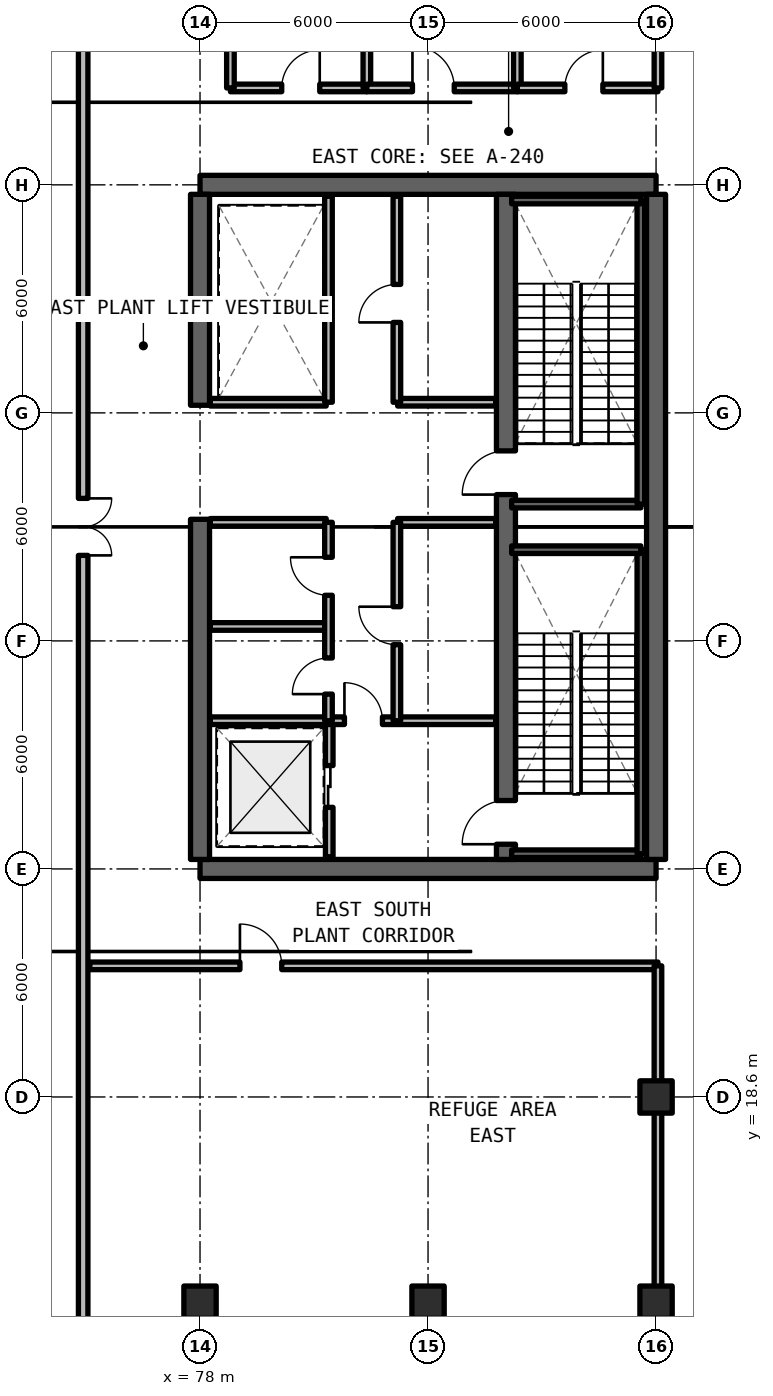
"""IFC4 building model, lengths in metres.
Left out: names, types, materials, properties, quantities, classifications, styles, units other than length and angle.
Written with IfcOpenShell. Run it as: python <this file> out.ifc"""

import sys

from ifc_helpers import new_model, si_unit, direction, frame, frame_2d, origin, origin_2d, place, context, subcontext, project, spatial, rectangle, extrude, element, fill, save


model = new_model("IFC4")
c1 = context("Model", 3, precision=1e-05, world=origin(), true_north=direction((0.0, 1.0)))
c2 = subcontext(c1, "Body", "Model", "MODEL_VIEW")
j1 = project(units=[si_unit("LENGTHUNIT", "METRE"), si_unit("PLANEANGLEUNIT", "RADIAN")], contexts=[c1])
p1 = place(None, origin())
s1 = spatial("IfcSite", under=j1, at=p1, CompositionType="ELEMENT")
p2 = place(p1, origin())
s2 = spatial("IfcBuilding", under=s1, at=p2, CompositionType="ELEMENT")
p3 = place(p2, frame((0.0, 0.0, 172.92)))
s3 = spatial("IfcBuildingStorey", under=s2, at=p3, CompositionType="ELEMENT", Elevation=172.92)
for number, where, z_axis, x_axis in (
    (1, (78.0, 24.6, 0.0), (0.0, 0.0, 1.0), (1.0, 0.0, 0.0)),
    (2, (90.0, 42.6, 0.0), (0.0, 0.0, 1.0), (-1.0, 0.0, 0.0)),
):
    element("IfcWall", number, at=place(p3, frame(where, z_axis=z_axis, x_axis=x_axis)), inside=s3, PredefinedType="SHEAR", context=c2, shape_type="SweptSolid", body=[
        extrude(rectangle(XDim=12.0, YDim=0.5, at=frame_2d((6.0, 0.0))), origin(), (0.0, 0.0, 1.0), 4.95),
    ])
p4 = place(p3, frame((90.0, 24.85, 0.0), z_axis=(0.0, 0.0, 1.0), x_axis=(0.0, 1.0, 0.0)))
e3 = element("IfcWall", 3, at=p4, inside=s3, PredefinedType="SHEAR", context=c2, shape_type="SweptSolid", body=[
    extrude(rectangle(XDim=17.5, YDim=0.5, at=frame_2d((8.75, 0.0))), origin(), (0.0, 0.0, 1.0), 4.95),
])
p5 = place(p3, frame((78.0, 24.85, 0.0), z_axis=(0.0, 0.0, 1.0), x_axis=(0.0, 1.0, 0.0)))
e4 = element("IfcWall", 4, at=p5, inside=s3, PredefinedType="SHEAR", context=c2, shape_type="SweptSolid", body=[
    extrude(rectangle(XDim=8.95, YDim=0.5, at=frame_2d((4.475, 0.0))), origin(), (0.0, 0.0, 1.0), 4.95),
])
p6 = place(p3, frame((78.0, 36.8, 0.0), z_axis=(0.0, 0.0, 1.0), x_axis=(0.0, 1.0, 0.0)))
e5 = element("IfcWall", 5, at=p6, inside=s3, PredefinedType="SHEAR", context=c2, shape_type="SweptSolid", body=[
    extrude(rectangle(XDim=5.55, YDim=0.5, at=frame_2d((2.775, 0.0))), origin(), (0.0, 0.0, 1.0), 4.95),
])
p7 = place(p3, frame((86.05, 24.85, 0.0), z_axis=(0.0, 0.0, 1.0), x_axis=(0.0, 1.0, 0.0)))
e6 = element("IfcWall", 6, at=p7, inside=s3, PredefinedType="SHEAR", context=c2, shape_type="SweptSolid", body=[
    extrude(rectangle(XDim=17.5, YDim=0.5, at=frame_2d((8.75, 0.0))), origin(), (0.0, 0.0, 1.0), 4.95),
])
p8 = place(p7, frame((0.4, 0.0, 0.0)))
e7 = element("IfcOpeningElement", 7, at=p8, cuts=e6, PredefinedType="OPENING", context=c2, shape_type="SweptSolid", body=[
    extrude(rectangle(XDim=1.15, YDim=2.15, at=frame_2d((0.575, 1.075))), frame((0.0, 0.26, 0.0), z_axis=(0.0, -1.0, 0.0), x_axis=(1.0, 0.0, 0.0)), (0.0, 0.0, 1.0), 0.52),
])
p9 = place(p7, frame((9.6, 0.0, 0.0)))
e8 = element("IfcOpeningElement", 8, at=p9, cuts=e6, PredefinedType="OPENING", context=c2, shape_type="SweptSolid", body=[
    extrude(rectangle(XDim=1.15, YDim=2.15, at=frame_2d((0.575, 1.075))), frame((0.0, 0.26, 0.0), z_axis=(0.0, -1.0, 0.0), x_axis=(1.0, 0.0, 0.0)), (0.0, 0.0, 1.0), 0.52),
])
p10 = place(p3, frame((90.0, 18.6, 0.0), z_axis=(0.0, 0.0, 1.0), x_axis=(1.0, 0.0, 0.0)))
e9 = element("IfcColumn", 9, at=p10, inside=s3, PredefinedType="COLUMN", context=c2, shape_type="SweptSolid", body=[
    extrude(rectangle(XDim=0.85, YDim=0.85, at=origin_2d()), origin(), (0.0, 0.0, 1.0), 4.95),
])
for number, where, z_axis, x_axis in (
    (10, (78.0, 13.2, 0.0), (0.0, 0.0, 1.0), (1.0, 0.0, 0.0)),
    (11, (84.0, 13.2, 0.0), (0.0, 0.0, 1.0), (1.0, 0.0, 0.0)),
    (12, (90.0, 13.2, 0.0), (0.0, 0.0, 1.0), (1.0, 0.0, 0.0)),
):
    element("IfcColumn", number, at=place(p3, frame(where, z_axis=z_axis, x_axis=x_axis)), inside=s3, PredefinedType="COLUMN", context=c2, shape_type="SweptSolid", body=[
        extrude(rectangle(XDim=0.85, YDim=0.85, at=origin_2d()), origin(), (0.0, 0.0, 1.0), 4.67),
    ])
p11 = place(p3, frame((74.925, 55.175, 0.0), z_axis=(0.0, 0.0, 1.0), x_axis=(0.0, -1.0, 0.0)))
e13 = element("IfcWall", 13, at=p11, inside=s3, PredefinedType="SOLIDWALL", context=c2, shape_type="SweptSolid", body=[
    extrude(rectangle(XDim=43.15, YDim=0.25, at=frame_2d((21.575, 0.0))), origin(), (0.0, 0.0, 1.0), 4.67),
])
p12 = place(p11, frame((20.825, 0.0, 0.0)))
e14 = element("IfcOpeningElement", 14, at=p12, cuts=e13, PredefinedType="OPENING", context=c2, shape_type="SweptSolid", body=[
    extrude(rectangle(XDim=1.5, YDim=2.2, at=frame_2d((0.75, 1.1))), frame((0.0, 0.135, 0.0), z_axis=(0.0, -1.0, 0.0), x_axis=(1.0, 0.0, 0.0)), (0.0, 0.0, 1.0), 0.27),
])
p13 = place(p3, frame((81.4, 24.92, 0.0), z_axis=(0.0, 0.0, 1.0), x_axis=(0.0, 1.0, 0.0)))
e15 = element("IfcWall", 15, at=p13, inside=s3, PredefinedType="SOLIDWALL", context=c2, shape_type="SweptSolid", body=[
    extrude(rectangle(XDim=3.58, YDim=0.2, at=frame_2d((1.79, 0.0))), origin(), (0.0, 0.0, 1.0), 3.89),
])
p14 = place(p13, frame((1.3, 0.0, 0.0)))
e16 = element("IfcOpeningElement", 16, at=p14, cuts=e15, PredefinedType="OPENING", context=c2, shape_type="SweptSolid", body=[
    extrude(rectangle(XDim=1.1, YDim=2.2, at=frame_2d((0.55, 1.1))), frame((0.0, 0.11, 0.0), z_axis=(0.0, -1.0, 0.0), x_axis=(1.0, 0.0, 0.0)), (0.0, 0.0, 1.0), 0.22),
])
p15 = place(p3, frame((78.27, 28.5, 0.0), z_axis=(0.0, 0.0, 1.0), x_axis=(1.0, 0.0, 0.0)))
e17 = element("IfcWall", 17, at=p15, inside=s3, PredefinedType="SOLIDWALL", context=c2, shape_type="SweptSolid", body=[
    extrude(rectangle(XDim=7.51, YDim=0.2, at=frame_2d((3.755, 0.0))), origin(), (0.0, 0.0, 1.0), 3.89),
])
p16 = place(p15, frame((3.53, 0.0, 0.0)))
e18 = element("IfcOpeningElement", 18, at=p16, cuts=e17, PredefinedType="OPENING", context=c2, shape_type="SweptSolid", body=[
    extrude(rectangle(XDim=1.0, YDim=2.15, at=frame_2d((0.5, 1.075))), frame((0.0, 0.11, 0.0), z_axis=(0.0, -1.0, 0.0), x_axis=(1.0, 0.0, 0.0)), (0.0, 0.0, 1.0), 0.22),
])
p17 = place(p3, frame((83.2, 33.72, 0.0), z_axis=(0.0, 0.0, 1.0), x_axis=(1.0, 0.0, 0.0)))
e19 = element("IfcWall", 19, at=p17, inside=s3, PredefinedType="SOLIDWALL", context=c2, shape_type="SweptSolid", body=[
    extrude(rectangle(XDim=2.58, YDim=0.2, at=frame_2d((1.29, 0.0))), origin(), (0.0, 0.0, 1.0), 3.89),
])
p18 = place(p3, frame((83.18, 28.5, 0.0), z_axis=(0.0, 0.0, 1.0), x_axis=(0.0, 1.0, 0.0)))
e20 = element("IfcWall", 20, at=p18, inside=s3, PredefinedType="SOLIDWALL", context=c2, shape_type="SweptSolid", body=[
    extrude(rectangle(XDim=5.22, YDim=0.2, at=frame_2d((2.61, 0.0))), origin(), (0.0, 0.0, 1.0), 3.89),
])
p19 = place(p18, frame((2.0, 0.0, 0.0)))
e21 = element("IfcOpeningElement", 21, at=p19, cuts=e20, PredefinedType="OPENING", context=c2, shape_type="SweptSolid", body=[
    extrude(rectangle(XDim=1.0, YDim=2.15, at=frame_2d((0.5, 1.075))), frame((0.0, 0.11, 0.0), z_axis=(0.0, -1.0, 0.0), x_axis=(1.0, 0.0, 0.0)), (0.0, 0.0, 1.0), 0.22),
])
for number, where, z_axis, x_axis in (
    (22, (78.27, 30.98, 0.0), (0.0, 0.0, 1.0), (1.0, 0.0, 0.0)),
    (23, (78.27, 33.72, 0.0), (0.0, 0.0, 1.0), (1.0, 0.0, 0.0)),
):
    element("IfcWall", number, at=place(p3, frame(where, z_axis=z_axis, x_axis=x_axis)), inside=s3, PredefinedType="SOLIDWALL", context=c2, shape_type="SweptSolid", body=[
        extrude(rectangle(XDim=3.05, YDim=0.2, at=frame_2d((1.525, 0.0))), origin(), (0.0, 0.0, 1.0), 3.89),
    ])
p20 = place(p3, frame((81.38, 28.5, 0.0), z_axis=(0.0, 0.0, 1.0), x_axis=(0.0, 1.0, 0.0)))
e24 = element("IfcWall", 24, at=p20, inside=s3, PredefinedType="SOLIDWALL", context=c2, shape_type="SweptSolid", body=[
    extrude(rectangle(XDim=5.22, YDim=0.2, at=frame_2d((2.61, 0.0))), origin(), (0.0, 0.0, 1.0), 3.89),
])
p21 = place(p20, frame((0.7, 0.0, 0.0)))
e25 = element("IfcOpeningElement", 25, at=p21, cuts=e24, PredefinedType="OPENING", context=c2, shape_type="SweptSolid", body=[
    extrude(rectangle(XDim=0.95, YDim=2.15, at=frame_2d((0.475, 1.075))), frame((0.0, 0.11, 0.0), z_axis=(0.0, -1.0, 0.0), x_axis=(1.0, 0.0, 0.0)), (0.0, 0.0, 1.0), 0.22),
])
p22 = place(p20, frame((3.3, 0.0, 0.0)))
e26 = element("IfcOpeningElement", 26, at=p22, cuts=e24, PredefinedType="OPENING", context=c2, shape_type="SweptSolid", body=[
    extrude(rectangle(XDim=1.0, YDim=2.15, at=frame_2d((0.5, 1.075))), frame((0.0, 0.11, 0.0), z_axis=(0.0, -1.0, 0.0), x_axis=(1.0, 0.0, 0.0)), (0.0, 0.0, 1.0), 0.22),
])
p23 = place(p3, frame((83.2, 36.88, 0.0), z_axis=(0.0, 0.0, 1.0), x_axis=(1.0, 0.0, 0.0)))
e27 = element("IfcWall", 27, at=p23, inside=s3, PredefinedType="SOLIDWALL", context=c2, shape_type="SweptSolid", body=[
    extrude(rectangle(XDim=2.58, YDim=0.2, at=frame_2d((1.29, 0.0))), origin(), (0.0, 0.0, 1.0), 3.89),
])
p24 = place(p3, frame((83.18, 36.88, 0.0), z_axis=(0.0, 0.0, 1.0), x_axis=(0.0, 1.0, 0.0)))
e28 = element("IfcWall", 28, at=p24, inside=s3, PredefinedType="SOLIDWALL", context=c2, shape_type="SweptSolid", body=[
    extrude(rectangle(XDim=5.42, YDim=0.2, at=frame_2d((2.71, 0.0))), origin(), (0.0, 0.0, 1.0), 3.89),
])
p25 = place(p24, frame((2.1, 0.0, 0.0)))
e29 = element("IfcOpeningElement", 29, at=p25, cuts=e28, PredefinedType="OPENING", context=c2, shape_type="SweptSolid", body=[
    extrude(rectangle(XDim=1.0, YDim=2.15, at=frame_2d((0.5, 1.075))), frame((0.0, 0.11, 0.0), z_axis=(0.0, -1.0, 0.0), x_axis=(1.0, 0.0, 0.0)), (0.0, 0.0, 1.0), 0.22),
])
p26 = place(p3, frame((78.27, 36.88, 0.0), z_axis=(0.0, 0.0, 1.0), x_axis=(1.0, 0.0, 0.0)))
e30 = element("IfcWall", 30, at=p26, inside=s3, PredefinedType="SOLIDWALL", context=c2, shape_type="SweptSolid", body=[
    extrude(rectangle(XDim=3.05, YDim=0.2, at=frame_2d((1.525, 0.0))), origin(), (0.0, 0.0, 1.0), 3.89),
])
p27 = place(p3, frame((81.38, 36.88, 0.0), z_axis=(0.0, 0.0, 1.0), x_axis=(0.0, 1.0, 0.0)))
e31 = element("IfcWall", 31, at=p27, inside=s3, PredefinedType="SOLIDWALL", context=c2, shape_type="SweptSolid", body=[
    extrude(rectangle(XDim=5.42, YDim=0.2, at=frame_2d((2.71, 0.0))), origin(), (0.0, 0.0, 1.0), 3.89),
])
p28 = place(p3, frame((75.1, 22.05, 0.0), z_axis=(0.0, 0.0, 1.0), x_axis=(1.0, 0.0, 0.0)))
e32 = element("IfcWall", 32, at=p28, inside=s3, PredefinedType="SOLIDWALL", context=c2, shape_type="SweptSolid", body=[
    extrude(rectangle(XDim=14.95, YDim=0.2, at=frame_2d((7.475, 0.0))), origin(), (0.0, 0.0, 1.0), 3.89),
])
p29 = place(p28, frame((3.95, 0.0, 0.0)))
e33 = element("IfcOpeningElement", 33, at=p29, cuts=e32, PredefinedType="OPENING", context=c2, shape_type="SweptSolid", body=[
    extrude(rectangle(XDim=1.1, YDim=2.15, at=frame_2d((0.55, 1.075))), frame((0.0, 0.11, 0.0), z_axis=(0.0, -1.0, 0.0), x_axis=(1.0, 0.0, 0.0)), (0.0, 0.0, 1.0), 0.22),
])
p30 = place(p3, frame((90.05, 12.15, 0.0), z_axis=(0.0, 0.0, 1.0), x_axis=(0.0, 1.0, 0.0)))
e34 = element("IfcWall", 34, at=p30, inside=s3, PredefinedType="SOLIDWALL", context=c2, shape_type="SweptSolid", body=[
    extrude(rectangle(XDim=9.9, YDim=0.2, at=frame_2d((4.95, 0.0))), origin(), (0.0, 0.0, 1.0), 3.647),
])
p31 = place(p3, frame((78.8, 45.15, 0.0), z_axis=(0.0, 0.0, 1.0), x_axis=(1.0, 0.0, 0.0)))
e35 = element("IfcWall", 35, at=p31, inside=s3, PredefinedType="SOLIDWALL", context=c2, shape_type="SweptSolid", body=[
    extrude(rectangle(XDim=3.59, YDim=0.2, at=frame_2d((1.795, 0.0))), origin(), (0.0, 0.0, 1.0), 3.89),
])
p32 = place(p31, frame((1.35, 0.0, 0.0)))
e36 = element("IfcOpeningElement", 36, at=p32, cuts=e35, PredefinedType="OPENING", context=c2, shape_type="SweptSolid", body=[
    extrude(rectangle(XDim=1.0, YDim=2.15, at=frame_2d((0.5, 1.075))), frame((0.0, 0.11, 0.0), z_axis=(0.0, -1.0, 0.0), x_axis=(1.0, 0.0, 0.0)), (0.0, 0.0, 1.0), 0.22),
])
for number, where, z_axis, x_axis in (
    (37, (78.8, 45.15, 0.0), (0.0, 0.0, 1.0), (0.0, 1.0, 0.0)),
    (38, (82.39, 45.15, 0.0), (0.0, 0.0, 1.0), (0.0, 1.0, 0.0)),
):
    element("IfcWall", number, at=place(p3, frame(where, z_axis=z_axis, x_axis=x_axis)), inside=s3, PredefinedType="SOLIDWALL", context=c2, shape_type="SweptSolid", body=[
        extrude(rectangle(XDim=9.9, YDim=0.2, at=frame_2d((4.95, 0.0))), origin(), (0.0, 0.0, 1.0), 3.89),
    ])
p33 = place(p3, frame((82.39, 45.15, 0.0), z_axis=(0.0, 0.0, 1.0), x_axis=(1.0, 0.0, 0.0)))
e39 = element("IfcWall", 39, at=p33, inside=s3, PredefinedType="SOLIDWALL", context=c2, shape_type="SweptSolid", body=[
    extrude(rectangle(XDim=3.96, YDim=0.2, at=frame_2d((1.98, 0.0))), origin(), (0.0, 0.0, 1.0), 3.89),
])
p34 = place(p33, frame((1.2, 0.0, 0.0)))
e40 = element("IfcOpeningElement", 40, at=p34, cuts=e39, PredefinedType="OPENING", context=c2, shape_type="SweptSolid", body=[
    extrude(rectangle(XDim=1.1, YDim=2.15, at=frame_2d((0.55, 1.075))), frame((0.0, 0.11, 0.0), z_axis=(0.0, -1.0, 0.0), x_axis=(1.0, 0.0, 0.0)), (0.0, 0.0, 1.0), 0.22),
])
p35 = place(p3, frame((86.35, 45.15, 0.0), z_axis=(0.0, 0.0, 1.0), x_axis=(0.0, 1.0, 0.0)))
e41 = element("IfcWall", 41, at=p35, inside=s3, PredefinedType="SOLIDWALL", context=c2, shape_type="SweptSolid", body=[
    extrude(rectangle(XDim=9.9, YDim=0.2, at=frame_2d((4.95, 0.0))), origin(), (0.0, 0.0, 1.0), 3.89),
])
p36 = place(p3, frame((86.35, 45.15, 0.0), z_axis=(0.0, 0.0, 1.0), x_axis=(1.0, 0.0, 0.0)))
e42 = element("IfcWall", 42, at=p36, inside=s3, PredefinedType="SOLIDWALL", context=c2, shape_type="SweptSolid", body=[
    extrude(rectangle(XDim=3.7, YDim=0.2, at=frame_2d((1.85, 0.0))), origin(), (0.0, 0.0, 1.0), 3.89),
])
p37 = place(p36, frame((1.25, 0.0, 0.0)))
e43 = element("IfcOpeningElement", 43, at=p37, cuts=e42, PredefinedType="OPENING", context=c2, shape_type="SweptSolid", body=[
    extrude(rectangle(XDim=1.0, YDim=2.15, at=frame_2d((0.5, 1.075))), frame((0.0, 0.11, 0.0), z_axis=(0.0, -1.0, 0.0), x_axis=(1.0, 0.0, 0.0)), (0.0, 0.0, 1.0), 0.22),
])
p38 = place(p3, frame((90.05, 45.15, 0.0), z_axis=(0.0, 0.0, 1.0), x_axis=(0.0, 1.0, 0.0)))
e44 = element("IfcWall", 44, at=p38, inside=s3, PredefinedType="SOLIDWALL", context=c2, shape_type="SweptSolid", body=[
    extrude(rectangle(XDim=9.9, YDim=0.2, at=frame_2d((4.95, 0.0))), origin(), (0.0, 0.0, 1.0), 3.647),
])
p39 = place(p3, frame((86.2, 25.0, 0.0), z_axis=(0.0, 0.0, 1.0), x_axis=(1.0, 0.0, 0.0)))
e45 = element("IfcWall", 45, at=p39, inside=s3, PredefinedType="SOLIDWALL", context=c2, shape_type="SweptSolid", body=[
    extrude(rectangle(XDim=3.4, YDim=0.2, at=frame_2d((1.7, 0.0))), origin(), (0.0, 0.0, 1.0), 4.95),
])
p40 = place(p3, frame((89.6, 25.0, 0.0), z_axis=(0.0, 0.0, 1.0), x_axis=(0.0, 1.0, 0.0)))
e46 = element("IfcWall", 46, at=p40, inside=s3, PredefinedType="SOLIDWALL", context=c2, shape_type="SweptSolid", body=[
    extrude(rectangle(XDim=8.0, YDim=0.2, at=frame_2d((4.0, 0.0))), origin(), (0.0, 0.0, 1.0), 4.95),
])
for number, where, z_axis, x_axis in (
    (47, (89.6, 33.0, 0.0), (0.0, 0.0, 1.0), (-1.0, 0.0, 0.0)),
    (48, (86.2, 34.2, 0.0), (0.0, 0.0, 1.0), (1.0, 0.0, 0.0)),
):
    element("IfcWall", number, at=place(p3, frame(where, z_axis=z_axis, x_axis=x_axis)), inside=s3, PredefinedType="SOLIDWALL", context=c2, shape_type="SweptSolid", body=[
        extrude(rectangle(XDim=3.4, YDim=0.2, at=frame_2d((1.7, 0.0))), origin(), (0.0, 0.0, 1.0), 4.95),
    ])
p41 = place(p3, frame((89.6, 34.2, 0.0), z_axis=(0.0, 0.0, 1.0), x_axis=(0.0, 1.0, 0.0)))
e49 = element("IfcWall", 49, at=p41, inside=s3, PredefinedType="SOLIDWALL", context=c2, shape_type="SweptSolid", body=[
    extrude(rectangle(XDim=8.0, YDim=0.2, at=frame_2d((4.0, 0.0))), origin(), (0.0, 0.0, 1.0), 4.95),
])
p42 = place(p3, frame((89.6, 42.2, 0.0), z_axis=(0.0, 0.0, 1.0), x_axis=(-1.0, 0.0, 0.0)))
e50 = element("IfcWall", 50, at=p42, inside=s3, PredefinedType="SOLIDWALL", context=c2, shape_type="SweptSolid", body=[
    extrude(rectangle(XDim=3.4, YDim=0.2, at=frame_2d((1.7, 0.0))), origin(), (0.0, 0.0, 1.0), 4.95),
])
p43 = place(p12, origin())
e51 = element("IfcDoor", 51, at=p43, inside=s3, OperationType="SINGLE_SWING_LEFT", PredefinedType="DOOR", context=c2, shape_type="SweptSolid", body=[
    extrude(rectangle(XDim=1.5, YDim=2.2, at=frame_2d((0.75, 1.1))), frame((0.0, 0.025, 0.0), z_axis=(0.0, -1.0, 0.0), x_axis=(1.0, 0.0, 0.0)), (0.0, 0.0, 1.0), 0.05),
])
fill(e14, e51)
p44 = place(p14, origin())
e52 = element("IfcDoor", 52, at=p44, inside=s3, OperationType="SLIDING_TO_LEFT", PredefinedType="DOOR", context=c2, shape_type="SweptSolid", body=[
    extrude(rectangle(XDim=1.1, YDim=2.2, at=frame_2d((0.55, 1.1))), frame((0.0, 0.025, 0.0), z_axis=(0.0, -1.0, 0.0), x_axis=(1.0, 0.0, 0.0)), (0.0, 0.0, 1.0), 0.05),
])
fill(e16, e52)
p45 = place(p16, origin())
e53 = element("IfcDoor", 53, at=p45, inside=s3, OperationType="SINGLE_SWING_LEFT", PredefinedType="DOOR", context=c2, shape_type="SweptSolid", body=[
    extrude(rectangle(XDim=1.0, YDim=2.15, at=frame_2d((0.5, 1.075))), frame((0.0, 0.025, 0.0), z_axis=(0.0, -1.0, 0.0), x_axis=(1.0, 0.0, 0.0)), (0.0, 0.0, 1.0), 0.05),
])
fill(e18, e53)
p46 = place(p19, origin())
e54 = element("IfcDoor", 54, at=p46, inside=s3, OperationType="SINGLE_SWING_RIGHT", PredefinedType="DOOR", context=c2, shape_type="SweptSolid", body=[
    extrude(rectangle(XDim=1.0, YDim=2.15, at=frame_2d((0.5, 1.075))), frame((0.0, 0.025, 0.0), z_axis=(0.0, -1.0, 0.0), x_axis=(1.0, 0.0, 0.0)), (0.0, 0.0, 1.0), 0.05),
])
fill(e21, e54)
p47 = place(p21, origin())
e55 = element("IfcDoor", 55, at=p47, inside=s3, OperationType="SINGLE_SWING_LEFT", PredefinedType="DOOR", context=c2, shape_type="SweptSolid", body=[
    extrude(rectangle(XDim=0.95, YDim=2.15, at=frame_2d((0.475, 1.075))), frame((0.0, 0.025, 0.0), z_axis=(0.0, -1.0, 0.0), x_axis=(1.0, 0.0, 0.0)), (0.0, 0.0, 1.0), 0.05),
])
fill(e25, e55)
p48 = place(p22, origin())
e56 = element("IfcDoor", 56, at=p48, inside=s3, OperationType="SINGLE_SWING_RIGHT", PredefinedType="DOOR", context=c2, shape_type="SweptSolid", body=[
    extrude(rectangle(XDim=1.0, YDim=2.15, at=frame_2d((0.5, 1.075))), frame((0.0, 0.025, 0.0), z_axis=(0.0, -1.0, 0.0), x_axis=(1.0, 0.0, 0.0)), (0.0, 0.0, 1.0), 0.05),
])
fill(e26, e56)
p49 = place(p25, origin())
e57 = element("IfcDoor", 57, at=p49, inside=s3, OperationType="SINGLE_SWING_LEFT", PredefinedType="DOOR", context=c2, shape_type="SweptSolid", body=[
    extrude(rectangle(XDim=1.0, YDim=2.15, at=frame_2d((0.5, 1.075))), frame((0.0, 0.025, 0.0), z_axis=(0.0, -1.0, 0.0), x_axis=(1.0, 0.0, 0.0)), (0.0, 0.0, 1.0), 0.05),
])
fill(e29, e57)
p50 = place(p29, origin())
e58 = element("IfcDoor", 58, at=p50, inside=s3, OperationType="SINGLE_SWING_LEFT", PredefinedType="DOOR", context=c2, shape_type="SweptSolid", body=[
    extrude(rectangle(XDim=1.1, YDim=2.15, at=frame_2d((0.55, 1.075))), frame((0.0, 0.025, 0.0), z_axis=(0.0, -1.0, 0.0), x_axis=(1.0, 0.0, 0.0)), (0.0, 0.0, 1.0), 0.05),
])
fill(e33, e58)
p51 = place(p32, origin())
e59 = element("IfcDoor", 59, at=p51, inside=s3, OperationType="SINGLE_SWING_RIGHT", PredefinedType="DOOR", context=c2, shape_type="SweptSolid", body=[
    extrude(rectangle(XDim=1.0, YDim=2.15, at=frame_2d((0.5, 1.075))), frame((0.0, 0.025, 0.0), z_axis=(0.0, -1.0, 0.0), x_axis=(1.0, 0.0, 0.0)), (0.0, 0.0, 1.0), 0.05),
])
fill(e36, e59)
p52 = place(p34, origin())
e60 = element("IfcDoor", 60, at=p52, inside=s3, OperationType="SINGLE_SWING_LEFT", PredefinedType="DOOR", context=c2, shape_type="SweptSolid", body=[
    extrude(rectangle(XDim=1.1, YDim=2.15, at=frame_2d((0.55, 1.075))), frame((0.0, 0.025, 0.0), z_axis=(0.0, -1.0, 0.0), x_axis=(1.0, 0.0, 0.0)), (0.0, 0.0, 1.0), 0.05),
])
fill(e40, e60)
p53 = place(p37, origin())
e61 = element("IfcDoor", 61, at=p53, inside=s3, OperationType="SINGLE_SWING_RIGHT", PredefinedType="DOOR", context=c2, shape_type="SweptSolid", body=[
    extrude(rectangle(XDim=1.0, YDim=2.15, at=frame_2d((0.5, 1.075))), frame((0.0, 0.025, 0.0), z_axis=(0.0, -1.0, 0.0), x_axis=(1.0, 0.0, 0.0)), (0.0, 0.0, 1.0), 0.05),
])
fill(e43, e61)
p54 = place(p8, origin())
e62 = element("IfcDoor", 62, at=p54, inside=s3, OperationType="SINGLE_SWING_LEFT", PredefinedType="DOOR", context=c2, shape_type="SweptSolid", body=[
    extrude(rectangle(XDim=1.15, YDim=2.15, at=frame_2d((0.575, 1.075))), frame((0.0, 0.025, 0.0), z_axis=(0.0, -1.0, 0.0), x_axis=(1.0, 0.0, 0.0)), (0.0, 0.0, 1.0), 0.05),
])
fill(e7, e62)
p55 = place(p9, origin())
e63 = element("IfcDoor", 63, at=p55, inside=s3, OperationType="SINGLE_SWING_RIGHT", PredefinedType="DOOR", context=c2, shape_type="SweptSolid", body=[
    extrude(rectangle(XDim=1.15, YDim=2.15, at=frame_2d((0.575, 1.075))), frame((0.0, 0.025, 0.0), z_axis=(0.0, -1.0, 0.0), x_axis=(1.0, 0.0, 0.0)), (0.0, 0.0, 1.0), 0.05),
])
fill(e8, e63)
save(model, sys.argv[1])
